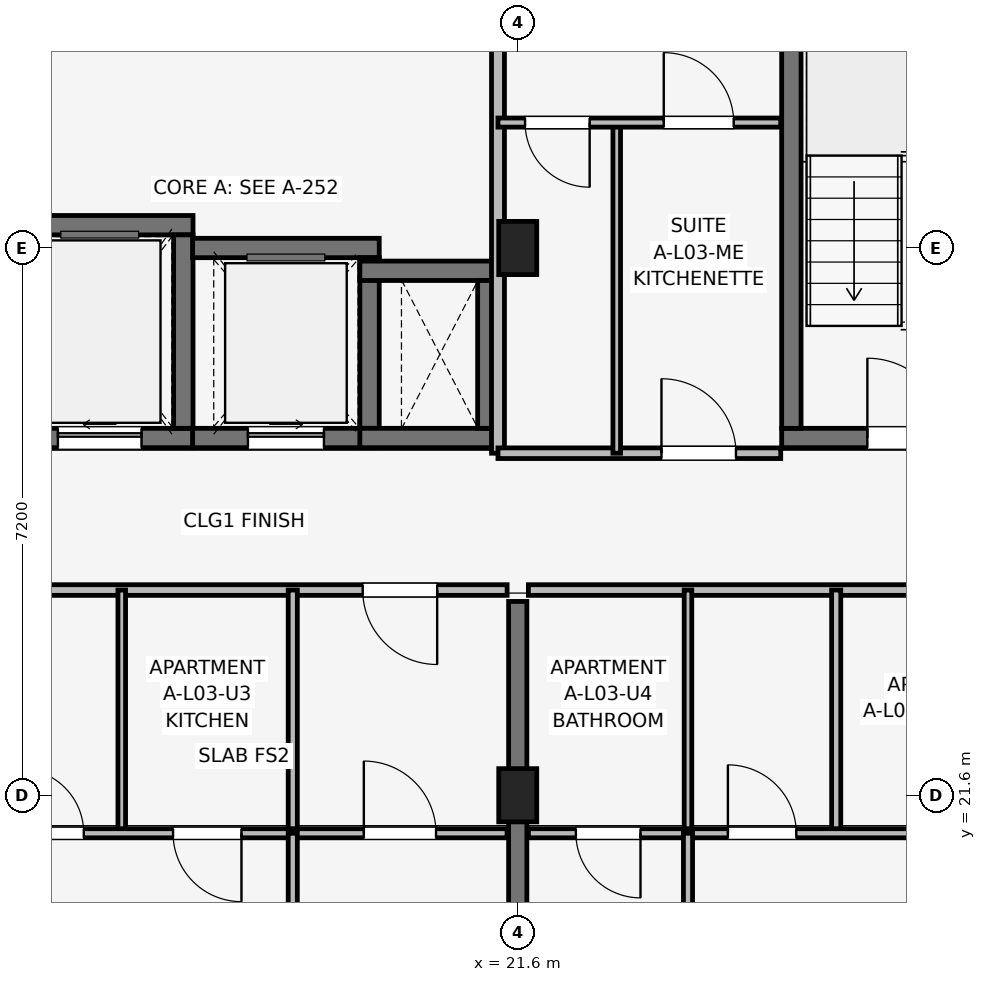
"""IFC4 building model, lengths in metres.
Left out: names, types, materials, properties, quantities, classifications, styles, units other than length and angle.
Written with IfcOpenShell. Run it as: python <this file> out.ifc"""

import sys

from ifc_helpers import new_model, si_unit, direction, frame, frame_2d, origin, origin_2d, place, context, subcontext, project, spatial, rectangle, extrude, element, fill, save


model = new_model("IFC4")
c1 = context("Model", 3, precision=1e-05, world=origin(), true_north=direction((0.0, 1.0)))
c2 = subcontext(c1, "Body", "Model", "MODEL_VIEW")
j1 = project(units=[si_unit("LENGTHUNIT", "METRE"), si_unit("PLANEANGLEUNIT", "RADIAN")], contexts=[c1])
p1 = place(None, origin())
s1 = spatial("IfcSite", under=j1, at=p1, CompositionType="ELEMENT")
p2 = place(p1, origin())
s2 = spatial("IfcBuilding", under=s1, at=p2, CompositionType="ELEMENT")
p3 = place(p2, frame((0.0, 0.0, 11.85)))
s3 = spatial("IfcBuildingStorey", under=s2, at=p3, CompositionType="ELEMENT", Elevation=11.85)
for number, where, z_axis, x_axis in (
    (1, (21.6, 21.6, 0.0), (0.0, 0.0, 1.0), (1.0, 0.0, 0.0)),
    (2, (21.6, 28.8, 0.0), (0.0, 0.0, 1.0), (1.0, 0.0, 0.0)),
):
    element("IfcColumn", number, at=place(p3, frame(where, z_axis=z_axis, x_axis=x_axis)), inside=s3, PredefinedType="COLUMN", context=c2, shape_type="SweptSolid", body=[
        extrude(rectangle(XDim=0.5, YDim=0.7, at=origin_2d()), origin(), (0.0, 0.0, 1.0), 3.15),
    ])
p4 = place(p3, frame((25.073, 26.3, 0.0), z_axis=(0.0, 0.0, 1.0), x_axis=(1.0, 0.0, 0.0)))
e3 = element("IfcWall", 3, at=p4, inside=s3, PredefinedType="SHEAR", context=c2, shape_type="SweptSolid", body=[
    extrude(rectangle(XDim=3.305, YDim=0.255, at=frame_2d((1.652, 0.0))), origin(), (0.0, 0.0, 1.0), 3.15),
])
p5 = place(p4, frame((1.127, 0.0, 0.0)))
e4 = element("IfcOpeningElement", 4, at=p5, cuts=e3, PredefinedType="OPENING", context=c2, shape_type="SweptSolid", body=[
    extrude(rectangle(XDim=1.05, YDim=2.12, at=frame_2d((0.525, 1.06))), frame((0.0, 0.137, 0.0), z_axis=(0.0, -1.0, 0.0), x_axis=(1.0, 0.0, 0.0)), (0.0, 0.0, 1.0), 0.275),
])
p6 = place(p3, frame((25.2, 26.427, 0.0), z_axis=(0.0, 0.0, 1.0), x_axis=(0.0, 1.0, 0.0)))
e5 = element("IfcWall", 5, at=p6, inside=s3, PredefinedType="SHEAR", context=c2, shape_type="SweptSolid", body=[
    extrude(rectangle(XDim=6.295, YDim=0.255, at=frame_2d((3.147, 0.0))), origin(), (0.0, 0.0, 1.0), 3.15),
])
p7 = place(p3, frame((14.873, 26.3, 0.0), z_axis=(0.0, 0.0, 1.0), x_axis=(1.0, 0.0, 0.0)))
e6 = element("IfcWall", 6, at=p7, inside=s3, PredefinedType="SHEAR", context=c2, shape_type="SweptSolid", body=[
    extrude(rectangle(XDim=2.455, YDim=0.255, at=frame_2d((1.228, 0.0))), origin(), (0.0, 0.0, 1.0), 3.15),
])
p8 = place(p7, frame((0.677, 0.0, 0.0)))
e7 = element("IfcOpeningElement", 7, at=p8, cuts=e6, PredefinedType="OPENING", context=c2, shape_type="SweptSolid", body=[
    extrude(rectangle(XDim=1.1, YDim=2.15, at=frame_2d((0.55, 1.075))), frame((0.0, 0.137, 0.0), z_axis=(0.0, -1.0, 0.0), x_axis=(1.0, 0.0, 0.0)), (0.0, 0.0, 1.0), 0.275),
])
p9 = place(p3, frame((14.873, 29.1, 0.0), z_axis=(0.0, 0.0, 1.0), x_axis=(1.0, 0.0, 0.0)))
e8 = element("IfcWall", 8, at=p9, inside=s3, PredefinedType="SHEAR", context=c2, shape_type="SweptSolid", body=[
    extrude(rectangle(XDim=2.455, YDim=0.255, at=frame_2d((1.228, 0.0))), origin(), (0.0, 0.0, 1.0), 3.15),
])
p10 = place(p3, frame((17.2, 26.427, 0.0), z_axis=(0.0, 0.0, 1.0), x_axis=(0.0, 1.0, 0.0)))
e9 = element("IfcWall", 9, at=p10, inside=s3, PredefinedType="SHEAR", context=c2, shape_type="SweptSolid", body=[
    extrude(rectangle(XDim=2.545, YDim=0.255, at=frame_2d((1.272, 0.0))), origin(), (0.0, 0.0, 1.0), 3.15),
])
p11 = place(p3, frame((17.323, 26.3, 0.0), z_axis=(0.0, 0.0, 1.0), x_axis=(1.0, 0.0, 0.0)))
e10 = element("IfcWall", 10, at=p11, inside=s3, PredefinedType="SHEAR", context=c2, shape_type="SweptSolid", body=[
    extrude(rectangle(XDim=2.455, YDim=0.255, at=frame_2d((1.228, 0.0))), origin(), (0.0, 0.0, 1.0), 3.15),
])
p12 = place(p11, frame((0.728, 0.0, 0.0)))
e11 = element("IfcOpeningElement", 11, at=p12, cuts=e10, PredefinedType="OPENING", context=c2, shape_type="SweptSolid", body=[
    extrude(rectangle(XDim=1.0, YDim=2.15, at=frame_2d((0.5, 1.075))), frame((0.0, 0.137, 0.0), z_axis=(0.0, -1.0, 0.0), x_axis=(1.0, 0.0, 0.0)), (0.0, 0.0, 1.0), 0.275),
])
p13 = place(p3, frame((17.323, 28.8, 0.0), z_axis=(0.0, 0.0, 1.0), x_axis=(1.0, 0.0, 0.0)))
e12 = element("IfcWall", 12, at=p13, inside=s3, PredefinedType="SHEAR", context=c2, shape_type="SweptSolid", body=[
    extrude(rectangle(XDim=2.455, YDim=0.255, at=frame_2d((1.228, 0.0))), origin(), (0.0, 0.0, 1.0), 3.15),
])
p14 = place(p3, frame((19.65, 26.427, 0.0), z_axis=(0.0, 0.0, 1.0), x_axis=(0.0, 1.0, 0.0)))
e13 = element("IfcWall", 13, at=p14, inside=s3, PredefinedType="SHEAR", context=c2, shape_type="SweptSolid", body=[
    extrude(rectangle(XDim=2.245, YDim=0.255, at=frame_2d((1.123, 0.0))), origin(), (0.0, 0.0, 1.0), 3.15),
])
for number, where, z_axis, x_axis in (
    (14, (19.522, 26.3, 0.0), (0.0, 0.0, 1.0), (1.0, 0.0, 0.0)),
    (15, (19.522, 28.5, 0.0), (0.0, 0.0, 1.0), (1.0, 0.0, 0.0)),
):
    element("IfcWall", number, at=place(p3, frame(where, z_axis=z_axis, x_axis=x_axis)), inside=s3, PredefinedType="SHEAR", context=c2, shape_type="SweptSolid", body=[
        extrude(rectangle(XDim=1.805, YDim=0.255, at=frame_2d((0.902, 0.0))), origin(), (0.0, 0.0, 1.0), 3.15),
    ])
p15 = place(p3, frame((21.2, 26.427, 0.0), z_axis=(0.0, 0.0, 1.0), x_axis=(0.0, 1.0, 0.0)))
e16 = element("IfcWall", 16, at=p15, inside=s3, PredefinedType="SHEAR", context=c2, shape_type="SweptSolid", body=[
    extrude(rectangle(XDim=1.945, YDim=0.255, at=frame_2d((0.973, 0.0))), origin(), (0.0, 0.0, 1.0), 3.15),
])
p16 = place(p3, frame((21.6, 14.75, 0.0), z_axis=(0.0, 0.0, 1.0), x_axis=(0.0, 1.0, 0.0)))
e17 = element("IfcWall", 17, at=p16, inside=s3, PredefinedType="SHEAR", context=c2, shape_type="SweptSolid", body=[
    extrude(rectangle(XDim=9.4, YDim=0.24, at=frame_2d((4.7, 0.0))), origin(), (0.0, 0.0, 1.0), 3.15),
])
p17 = place(p3, frame((14.54, 24.3, 0.0), z_axis=(0.0, 0.0, 1.0), x_axis=(1.0, 0.0, 0.0)))
e18 = element("IfcWall", 18, at=p17, inside=s3, PredefinedType="PARTITIONING", context=c2, shape_type="SweptSolid", body=[
    extrude(rectangle(XDim=6.92, YDim=0.14, at=frame_2d((3.46, 0.0))), origin(), (0.0, 0.0, 1.0), 2.38),
])
p18 = place(p17, frame((6.0, 0.0, 0.0), z_axis=(0.0, 0.0, 1.0), x_axis=(-1.0, 0.0, 0.0)))
e19 = element("IfcOpeningElement", 19, at=p18, cuts=e18, PredefinedType="OPENING", context=c2, shape_type="SweptSolid", body=[
    extrude(rectangle(XDim=0.98, YDim=2.1, at=frame_2d((0.49, 1.05))), frame((0.0, 0.08, 0.0), z_axis=(0.0, -1.0, 0.0), x_axis=(1.0, 0.0, 0.0)), (0.0, 0.0, 1.0), 0.16),
])
p19 = place(p3, frame((16.39, 21.1, 0.0), z_axis=(0.0, 0.0, 1.0), x_axis=(0.0, 1.0, 0.0)))
e20 = element("IfcWall", 20, at=p19, inside=s3, PredefinedType="PARTITIONING", context=c2, shape_type="SweptSolid", body=[
    extrude(rectangle(XDim=3.2, YDim=0.1, at=frame_2d((1.6, 0.0))), origin(), (0.0, 0.0, 1.0), 2.375),
])
p20 = place(p3, frame((18.64, 21.1, 0.0), z_axis=(0.0, 0.0, 1.0), x_axis=(0.0, 1.0, 0.0)))
e21 = element("IfcWall", 21, at=p20, inside=s3, PredefinedType="PARTITIONING", context=c2, shape_type="SweptSolid", body=[
    extrude(rectangle(XDim=3.2, YDim=0.12, at=frame_2d((1.6, 0.0))), origin(), (0.0, 0.0, 1.0), 2.375),
])
p21 = place(p3, frame((14.54, 21.1, 0.0), z_axis=(0.0, 0.0, 1.0), x_axis=(1.0, 0.0, 0.0)))
e22 = element("IfcWall", 22, at=p21, inside=s3, PredefinedType="PARTITIONING", context=c2, shape_type="SweptSolid", body=[
    extrude(rectangle(XDim=6.92, YDim=0.12, at=frame_2d((3.46, 0.0))), origin(), (0.0, 0.0, 1.0), 2.38),
])
p22 = place(p21, frame((0.5, 0.0, 0.0)))
e23 = element("IfcOpeningElement", 23, at=p22, cuts=e22, PredefinedType="OPENING", context=c2, shape_type="SweptSolid", body=[
    extrude(rectangle(XDim=0.85, YDim=2.08, at=frame_2d((0.425, 1.04))), frame((0.0, 0.07, 0.0), z_axis=(0.0, -1.0, 0.0), x_axis=(1.0, 0.0, 0.0)), (0.0, 0.0, 1.0), 0.14),
])
p23 = place(p21, frame((3.425, 0.0, 0.0), z_axis=(0.0, 0.0, 1.0), x_axis=(-1.0, 0.0, 0.0)))
e24 = element("IfcOpeningElement", 24, at=p23, cuts=e22, PredefinedType="OPENING", context=c2, shape_type="SweptSolid", body=[
    extrude(rectangle(XDim=0.9, YDim=2.08, at=frame_2d((0.45, 1.04))), frame((0.0, 0.07, 0.0), z_axis=(0.0, -1.0, 0.0), x_axis=(1.0, 0.0, 0.0)), (0.0, 0.0, 1.0), 0.14),
])
p24 = place(p21, frame((5.035, 0.0, 0.0)))
e25 = element("IfcOpeningElement", 25, at=p24, cuts=e22, PredefinedType="OPENING", context=c2, shape_type="SweptSolid", body=[
    extrude(rectangle(XDim=0.95, YDim=2.08, at=frame_2d((0.475, 1.04))), frame((0.0, 0.07, 0.0), z_axis=(0.0, -1.0, 0.0), x_axis=(1.0, 0.0, 0.0)), (0.0, 0.0, 1.0), 0.14),
])
p25 = place(p3, frame((18.64, 14.7, 0.0), z_axis=(0.0, 0.0, 1.0), x_axis=(0.0, 1.0, 0.0)))
e26 = element("IfcWall", 26, at=p25, inside=s3, PredefinedType="PARTITIONING", context=c2, shape_type="SweptSolid", body=[
    extrude(rectangle(XDim=6.4, YDim=0.12, at=frame_2d((3.2, 0.0))), origin(), (0.0, 0.0, 1.0), 2.38),
])
p26 = place(p25, frame((3.65, 0.0, 0.0), z_axis=(0.0, 0.0, 1.0), x_axis=(-1.0, 0.0, 0.0)))
e27 = element("IfcOpeningElement", 27, at=p26, cuts=e26, PredefinedType="OPENING", context=c2, shape_type="SweptSolid", body=[
    extrude(rectangle(XDim=0.9, YDim=2.08, at=frame_2d((0.45, 1.04))), frame((0.0, 0.07, 0.0), z_axis=(0.0, -1.0, 0.0), x_axis=(1.0, 0.0, 0.0)), (0.0, 0.0, 1.0), 0.14),
])
p27 = place(p3, frame((21.74, 24.3, 0.0), z_axis=(0.0, 0.0, 1.0), x_axis=(1.0, 0.0, 0.0)))
e28 = element("IfcWall", 28, at=p27, inside=s3, PredefinedType="PARTITIONING", context=c2, shape_type="SweptSolid", body=[
    extrude(rectangle(XDim=6.92, YDim=0.14, at=frame_2d((3.46, 0.0))), origin(), (0.0, 0.0, 1.0), 2.38),
])
p28 = place(p27, frame((4.995, 0.0, 0.0)))
e29 = element("IfcOpeningElement", 29, at=p28, cuts=e28, PredefinedType="OPENING", context=c2, shape_type="SweptSolid", body=[
    extrude(rectangle(XDim=0.98, YDim=2.1, at=frame_2d((0.49, 1.05))), frame((0.0, 0.08, 0.0), z_axis=(0.0, -1.0, 0.0), x_axis=(1.0, 0.0, 0.0)), (0.0, 0.0, 1.0), 0.16),
])
p29 = place(p3, frame((23.84, 21.1, 0.0), z_axis=(0.0, 0.0, 1.0), x_axis=(0.0, 1.0, 0.0)))
e30 = element("IfcWall", 30, at=p29, inside=s3, PredefinedType="PARTITIONING", context=c2, shape_type="SweptSolid", body=[
    extrude(rectangle(XDim=3.2, YDim=0.1, at=frame_2d((1.6, 0.0))), origin(), (0.0, 0.0, 1.0), 2.375),
])
p30 = place(p3, frame((25.79, 21.1, 0.0), z_axis=(0.0, 0.0, 1.0), x_axis=(0.0, 1.0, 0.0)))
e31 = element("IfcWall", 31, at=p30, inside=s3, PredefinedType="PARTITIONING", context=c2, shape_type="SweptSolid", body=[
    extrude(rectangle(XDim=3.2, YDim=0.12, at=frame_2d((1.6, 0.0))), origin(), (0.0, 0.0, 1.0), 2.375),
])
p31 = place(p3, frame((21.74, 21.1, 0.0), z_axis=(0.0, 0.0, 1.0), x_axis=(1.0, 0.0, 0.0)))
e32 = element("IfcWall", 32, at=p31, inside=s3, PredefinedType="PARTITIONING", context=c2, shape_type="SweptSolid", body=[
    extrude(rectangle(XDim=6.92, YDim=0.12, at=frame_2d((3.46, 0.0))), origin(), (0.0, 0.0, 1.0), 2.38),
])
p32 = place(p31, frame((1.475, 0.0, 0.0), z_axis=(0.0, 0.0, 1.0), x_axis=(-1.0, 0.0, 0.0)))
e33 = element("IfcOpeningElement", 33, at=p32, cuts=e32, PredefinedType="OPENING", context=c2, shape_type="SweptSolid", body=[
    extrude(rectangle(XDim=0.85, YDim=2.08, at=frame_2d((0.425, 1.04))), frame((0.0, 0.07, 0.0), z_axis=(0.0, -1.0, 0.0), x_axis=(1.0, 0.0, 0.0)), (0.0, 0.0, 1.0), 0.14),
])
p33 = place(p31, frame((2.625, 0.0, 0.0)))
e34 = element("IfcOpeningElement", 34, at=p33, cuts=e32, PredefinedType="OPENING", context=c2, shape_type="SweptSolid", body=[
    extrude(rectangle(XDim=0.9, YDim=2.08, at=frame_2d((0.45, 1.04))), frame((0.0, 0.07, 0.0), z_axis=(0.0, -1.0, 0.0), x_axis=(1.0, 0.0, 0.0)), (0.0, 0.0, 1.0), 0.14),
])
p34 = place(p31, frame((5.96, 0.0, 0.0), z_axis=(0.0, 0.0, 1.0), x_axis=(-1.0, 0.0, 0.0)))
e35 = element("IfcOpeningElement", 35, at=p34, cuts=e32, PredefinedType="OPENING", context=c2, shape_type="SweptSolid", body=[
    extrude(rectangle(XDim=0.95, YDim=2.08, at=frame_2d((0.475, 1.04))), frame((0.0, 0.07, 0.0), z_axis=(0.0, -1.0, 0.0), x_axis=(1.0, 0.0, 0.0)), (0.0, 0.0, 1.0), 0.14),
])
p35 = place(p3, frame((23.84, 14.7, 0.0), z_axis=(0.0, 0.0, 1.0), x_axis=(0.0, 1.0, 0.0)))
e36 = element("IfcWall", 36, at=p35, inside=s3, PredefinedType="PARTITIONING", context=c2, shape_type="SweptSolid", body=[
    extrude(rectangle(XDim=6.4, YDim=0.12, at=frame_2d((3.2, 0.0))), origin(), (0.0, 0.0, 1.0), 2.38),
])
p36 = place(p35, frame((2.75, 0.0, 0.0)))
e37 = element("IfcOpeningElement", 37, at=p36, cuts=e36, PredefinedType="OPENING", context=c2, shape_type="SweptSolid", body=[
    extrude(rectangle(XDim=0.9, YDim=2.08, at=frame_2d((0.45, 1.04))), frame((0.0, 0.07, 0.0), z_axis=(0.0, -1.0, 0.0), x_axis=(1.0, 0.0, 0.0)), (0.0, 0.0, 1.0), 0.14),
])
p37 = place(p3, frame((21.34, 26.1, 0.0), z_axis=(0.0, 0.0, 1.0), x_axis=(0.0, 1.0, 0.0)))
e38 = element("IfcWall", 38, at=p37, inside=s3, PredefinedType="PARTITIONING", context=c2, shape_type="SweptSolid", body=[
    extrude(rectangle(XDim=9.6, YDim=0.17, at=frame_2d((4.8, 0.0))), origin(), (0.0, 0.0, 1.0), 2.38),
])
p38 = place(p3, frame((21.34, 26.1, 0.0), z_axis=(0.0, 0.0, 1.0), x_axis=(1.0, 0.0, 0.0)))
e39 = element("IfcWall", 39, at=p38, inside=s3, PredefinedType="PARTITIONING", context=c2, shape_type="SweptSolid", body=[
    extrude(rectangle(XDim=3.72, YDim=0.14, at=frame_2d((1.86, 0.0))), origin(), (0.0, 0.0, 1.0), 2.38),
])
p39 = place(p38, frame((2.151, 0.0, 0.0)))
e40 = element("IfcOpeningElement", 40, at=p39, cuts=e39, PredefinedType="OPENING", context=c2, shape_type="SweptSolid", body=[
    extrude(rectangle(XDim=0.98, YDim=2.1, at=frame_2d((0.49, 1.05))), frame((0.0, 0.08, 0.0), z_axis=(0.0, -1.0, 0.0), x_axis=(1.0, 0.0, 0.0)), (0.0, 0.0, 1.0), 0.16),
])
p40 = place(p3, frame((22.902, 26.1, 0.0), z_axis=(0.0, 0.0, 1.0), x_axis=(0.0, 1.0, 0.0)))
e41 = element("IfcWall", 41, at=p40, inside=s3, PredefinedType="PARTITIONING", context=c2, shape_type="SweptSolid", body=[
    extrude(rectangle(XDim=4.35, YDim=0.1, at=frame_2d((2.175, 0.0))), origin(), (0.0, 0.0, 1.0), 2.375),
])
p41 = place(p3, frame((21.34, 30.45, 0.0), z_axis=(0.0, 0.0, 1.0), x_axis=(1.0, 0.0, 0.0)))
e42 = element("IfcWall", 42, at=p41, inside=s3, PredefinedType="PARTITIONING", context=c2, shape_type="SweptSolid", body=[
    extrude(rectangle(XDim=3.72, YDim=0.12, at=frame_2d((1.86, 0.0))), origin(), (0.0, 0.0, 1.0), 2.38),
])
p42 = place(p41, frame((1.206, 0.0, 0.0), z_axis=(0.0, 0.0, 1.0), x_axis=(-1.0, 0.0, 0.0)))
e43 = element("IfcOpeningElement", 43, at=p42, cuts=e42, PredefinedType="OPENING", context=c2, shape_type="SweptSolid", body=[
    extrude(rectangle(XDim=0.85, YDim=2.08, at=frame_2d((0.425, 1.04))), frame((0.0, 0.07, 0.0), z_axis=(0.0, -1.0, 0.0), x_axis=(1.0, 0.0, 0.0)), (0.0, 0.0, 1.0), 0.14),
])
p43 = place(p41, frame((2.181, 0.0, 0.0)))
e44 = element("IfcOpeningElement", 44, at=p43, cuts=e42, PredefinedType="OPENING", context=c2, shape_type="SweptSolid", body=[
    extrude(rectangle(XDim=0.92, YDim=2.08, at=frame_2d((0.46, 1.04))), frame((0.0, 0.07, 0.0), z_axis=(0.0, -1.0, 0.0), x_axis=(1.0, 0.0, 0.0)), (0.0, 0.0, 1.0), 0.14),
])
p44 = place(p18, origin())
e45 = element("IfcDoor", 45, at=p44, inside=s3, OperationType="SINGLE_SWING_RIGHT", PredefinedType="DOOR", context=c2, shape_type="SweptSolid", body=[
    extrude(rectangle(XDim=0.98, YDim=2.1, at=frame_2d((0.49, 1.05))), frame((0.0, 0.025, 0.0), z_axis=(0.0, -1.0, 0.0), x_axis=(1.0, 0.0, 0.0)), (0.0, 0.0, 1.0), 0.05),
])
fill(e19, e45)
p45 = place(p22, origin())
e46 = element("IfcDoor", 46, at=p45, inside=s3, OperationType="SINGLE_SWING_LEFT", PredefinedType="DOOR", context=c2, shape_type="SweptSolid", body=[
    extrude(rectangle(XDim=0.85, YDim=2.08, at=frame_2d((0.425, 1.04))), frame((0.0, 0.025, 0.0), z_axis=(0.0, -1.0, 0.0), x_axis=(1.0, 0.0, 0.0)), (0.0, 0.0, 1.0), 0.05),
])
fill(e23, e46)
p46 = place(p23, origin())
e47 = element("IfcDoor", 47, at=p46, inside=s3, OperationType="SINGLE_SWING_RIGHT", PredefinedType="DOOR", context=c2, shape_type="SweptSolid", body=[
    extrude(rectangle(XDim=0.9, YDim=2.08, at=frame_2d((0.45, 1.04))), frame((0.0, 0.025, 0.0), z_axis=(0.0, -1.0, 0.0), x_axis=(1.0, 0.0, 0.0)), (0.0, 0.0, 1.0), 0.05),
])
fill(e24, e47)
p47 = place(p24, origin())
e48 = element("IfcDoor", 48, at=p47, inside=s3, OperationType="SINGLE_SWING_LEFT", PredefinedType="DOOR", context=c2, shape_type="SweptSolid", body=[
    extrude(rectangle(XDim=0.95, YDim=2.08, at=frame_2d((0.475, 1.04))), frame((0.0, 0.025, 0.0), z_axis=(0.0, -1.0, 0.0), x_axis=(1.0, 0.0, 0.0)), (0.0, 0.0, 1.0), 0.05),
])
fill(e25, e48)
p48 = place(p32, origin())
e49 = element("IfcDoor", 49, at=p48, inside=s3, OperationType="SINGLE_SWING_RIGHT", PredefinedType="DOOR", context=c2, shape_type="SweptSolid", body=[
    extrude(rectangle(XDim=0.85, YDim=2.08, at=frame_2d((0.425, 1.04))), frame((0.0, 0.025, 0.0), z_axis=(0.0, -1.0, 0.0), x_axis=(1.0, 0.0, 0.0)), (0.0, 0.0, 1.0), 0.05),
])
fill(e33, e49)
p49 = place(p33, origin())
e50 = element("IfcDoor", 50, at=p49, inside=s3, OperationType="SINGLE_SWING_LEFT", PredefinedType="DOOR", context=c2, shape_type="SweptSolid", body=[
    extrude(rectangle(XDim=0.9, YDim=2.08, at=frame_2d((0.45, 1.04))), frame((0.0, 0.025, 0.0), z_axis=(0.0, -1.0, 0.0), x_axis=(1.0, 0.0, 0.0)), (0.0, 0.0, 1.0), 0.05),
])
fill(e34, e50)
p50 = place(p39, origin())
e51 = element("IfcDoor", 51, at=p50, inside=s3, OperationType="SINGLE_SWING_LEFT", PredefinedType="DOOR", context=c2, shape_type="SweptSolid", body=[
    extrude(rectangle(XDim=0.98, YDim=2.1, at=frame_2d((0.49, 1.05))), frame((0.0, 0.025, 0.0), z_axis=(0.0, -1.0, 0.0), x_axis=(1.0, 0.0, 0.0)), (0.0, 0.0, 1.0), 0.05),
])
fill(e40, e51)
p51 = place(p42, origin())
e52 = element("IfcDoor", 52, at=p51, inside=s3, OperationType="SINGLE_SWING_RIGHT", PredefinedType="DOOR", context=c2, shape_type="SweptSolid", body=[
    extrude(rectangle(XDim=0.85, YDim=2.08, at=frame_2d((0.425, 1.04))), frame((0.0, 0.025, 0.0), z_axis=(0.0, -1.0, 0.0), x_axis=(1.0, 0.0, 0.0)), (0.0, 0.0, 1.0), 0.05),
])
fill(e43, e52)
p52 = place(p43, origin())
e53 = element("IfcDoor", 53, at=p52, inside=s3, OperationType="SINGLE_SWING_LEFT", PredefinedType="DOOR", context=c2, shape_type="SweptSolid", body=[
    extrude(rectangle(XDim=0.92, YDim=2.08, at=frame_2d((0.46, 1.04))), frame((0.0, 0.025, 0.0), z_axis=(0.0, -1.0, 0.0), x_axis=(1.0, 0.0, 0.0)), (0.0, 0.0, 1.0), 0.05),
])
fill(e44, e53)
p53 = place(p5, origin())
e54 = element("IfcDoor", 54, at=p53, inside=s3, OperationType="SINGLE_SWING_LEFT", PredefinedType="DOOR", context=c2, shape_type="SweptSolid", body=[
    extrude(rectangle(XDim=1.05, YDim=2.12, at=frame_2d((0.525, 1.06))), frame((0.0, 0.025, 0.0), z_axis=(0.0, -1.0, 0.0), x_axis=(1.0, 0.0, 0.0)), (0.0, 0.0, 1.0), 0.05),
])
fill(e4, e54)
p54 = place(p8, origin())
e55 = element("IfcDoor", 55, at=p54, inside=s3, OperationType="SLIDING_TO_LEFT", PredefinedType="DOOR", context=c2, shape_type="SweptSolid", body=[
    extrude(rectangle(XDim=1.1, YDim=2.15, at=frame_2d((0.55, 1.075))), frame((0.0, 0.025, 0.0), z_axis=(0.0, -1.0, 0.0), x_axis=(1.0, 0.0, 0.0)), (0.0, 0.0, 1.0), 0.05),
])
fill(e7, e55)
p55 = place(p12, origin())
e56 = element("IfcDoor", 56, at=p55, inside=s3, OperationType="SLIDING_TO_RIGHT", PredefinedType="DOOR", context=c2, shape_type="SweptSolid", body=[
    extrude(rectangle(XDim=1.0, YDim=2.15, at=frame_2d((0.5, 1.075))), frame((0.0, 0.025, 0.0), z_axis=(0.0, -1.0, 0.0), x_axis=(1.0, 0.0, 0.0)), (0.0, 0.0, 1.0), 0.05),
])
fill(e11, e56)
save(model, sys.argv[1])
